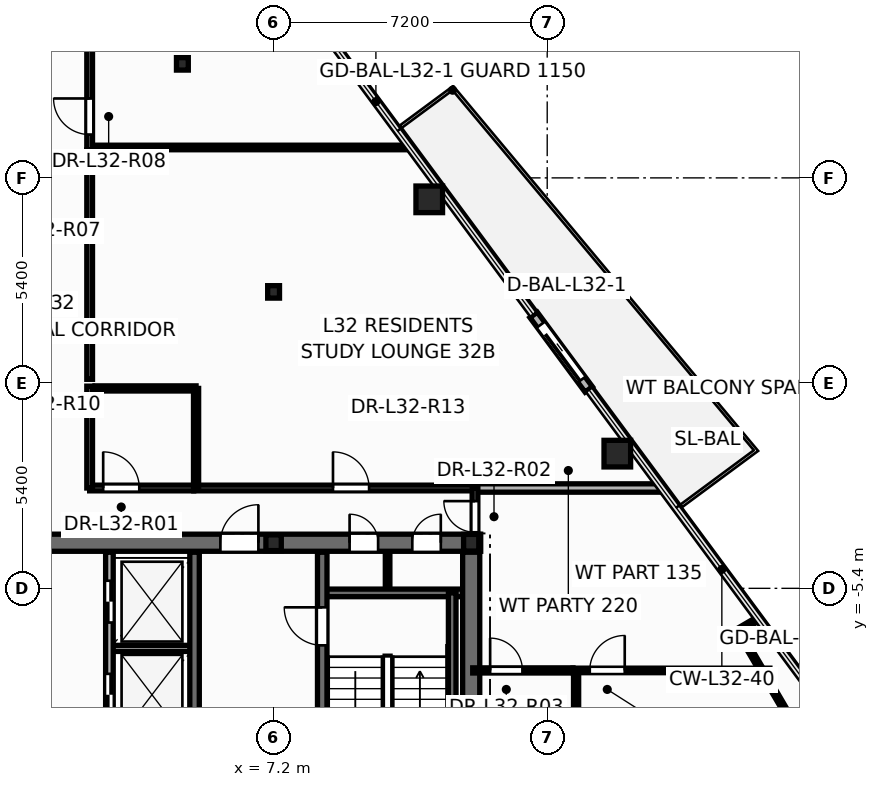
"""IFC4 building model, lengths in metres.
Left out: names, types, materials, properties, quantities, classifications, styles, units other than length and angle.
Written with IfcOpenShell. Run it as: python <this file> out.ifc"""

import sys

from ifc_helpers import new_model, si_unit, direction, frame, frame_2d, origin, origin_2d, place, context, subcontext, project, spatial, rectangle, hollow_circle, i_section, extrude, element, fill, save


model = new_model("IFC4")
c1 = context("Model", 3, precision=1e-05, world=origin(), true_north=direction((0.0, 1.0)))
c2 = subcontext(c1, "Body", "Model", "MODEL_VIEW")
j1 = project(units=[si_unit("LENGTHUNIT", "METRE"), si_unit("PLANEANGLEUNIT", "RADIAN")], contexts=[c1])
p1 = place(None, origin())
s1 = spatial("IfcSite", under=j1, at=p1, CompositionType="ELEMENT")
p2 = place(p1, origin())
s2 = spatial("IfcBuilding", under=s1, at=p2, CompositionType="ELEMENT")
p3 = place(p2, frame((0.0, 0.0, 125.7)))
s3 = spatial("IfcBuildingStorey", under=s2, at=p3, CompositionType="ELEMENT", Elevation=125.7)
for number, where, z_axis, x_axis in (
    (1, (16.245, -1.856, 0.0), (0.0, 0.0, 1.0), (1.0, 0.0, 0.0)),
    (2, (11.296, 4.836, 0.0), (0.0, 0.0, 1.0), (1.0, 0.0, 0.0)),
):
    element("IfcColumn", number, at=place(p3, frame(where, z_axis=z_axis, x_axis=x_axis)), inside=s3, PredefinedType="COLUMN", context=c2, shape_type="SweptSolid", body=[
        extrude(hollow_circle(Radius=0.35, WallThickness=0.03, at=origin_2d()), origin(), (0.0, 0.0, 1.0), 3.6),
    ])
p4 = place(p3, frame((12.4, -4.2, 0.0), z_axis=(0.0, 0.0, 1.0), x_axis=(1.0, 0.0, 0.0)))
e3 = element("IfcColumn", 3, at=p4, inside=s3, PredefinedType="COLUMN", context=c2, shape_type="SweptSolid", body=[
    extrude(i_section(OverallWidth=0.4, OverallDepth=0.44, WebThickness=0.028, FlangeThickness=0.04, at=origin_2d()), origin(), (0.0, 0.0, 1.0), 3.6),
])
p5 = place(p3, frame((7.2, -4.2, 0.0), z_axis=(0.0, 0.0, 1.0), x_axis=(1.0, 0.0, 0.0)))
e4 = element("IfcColumn", 4, at=p5, inside=s3, PredefinedType="PILASTER", context=c2, shape_type="SweptSolid", body=[
    extrude(i_section(OverallWidth=0.405, OverallDepth=0.414, WebThickness=0.022, FlangeThickness=0.032, at=origin_2d()), origin(), (0.0, 0.0, 1.0), 3.6),
])
for number, where, z_axis, x_axis in (
    (5, (7.2, 2.4, 0.0), (0.0, 0.0, 1.0), (1.0, 0.0, 0.0)),
    (6, (4.8, 8.4, 0.0), (0.0, 0.0, 1.0), (1.0, 0.0, 0.0)),
):
    element("IfcColumn", number, at=place(p3, frame(where, z_axis=z_axis, x_axis=x_axis)), inside=s3, PredefinedType="COLUMN", context=c2, shape_type="SweptSolid", body=[
        extrude(i_section(OverallWidth=0.311, OverallDepth=0.327, WebThickness=0.016, FlangeThickness=0.025, at=origin_2d()), origin(), (0.0, 0.0, 1.0), 3.6),
    ])
p6 = place(p3, frame((15.493, -0.166, -0.015), z_axis=(0.0, 0.0, 1.0), x_axis=(-0.594655490218, 0.803980626603, 0.0)))
e7 = element("IfcWall", 7, at=p6, inside=s3, PredefinedType="STANDARD", context=c2, shape_type="SweptSolid", body=[
    extrude(rectangle(XDim=2.44, YDim=0.24, at=frame_2d((1.22, 0.0))), origin(), (0.0, 0.0, 1.0), 2.807),
])
p7 = place(p6, frame((0.32, 0.0, 0.015)))
e8 = element("IfcOpeningElement", 8, at=p7, cuts=e7, PredefinedType="OPENING", context=c2, shape_type="SweptSolid", body=[
    extrude(rectangle(XDim=1.806, YDim=2.204, at=frame_2d((0.9, 1.102))), frame((0.0, 0.13, 0.0), z_axis=(0.0, -1.0, 0.0), x_axis=(1.0, 0.0, 0.0)), (0.0, 0.0, 1.0), 0.26),
])
p8 = place(p3, frame((2.88, -6.98, 0.0), z_axis=(0.0, 0.0, 1.0), x_axis=(1.0, 0.0, 0.0)))
e9 = element("IfcWall", 9, at=p8, inside=s3, PredefinedType="PARTITIONING", context=c2, shape_type="SweptSolid", body=[
    extrude(rectangle(XDim=2.24, YDim=0.16, at=frame_2d((1.12, 0.0))), origin(), (0.0, 0.0, 1.0), 3.35),
])
p9 = place(p3, frame((10.2, -5.52, 0.0), z_axis=(0.0, 0.0, 1.0), x_axis=(0.0, 1.0, 0.0)))
e10 = element("IfcWall", 10, at=p9, inside=s3, PredefinedType="PARTITIONING", context=c2, shape_type="SweptSolid", body=[
    extrude(rectangle(XDim=1.12, YDim=0.12, at=frame_2d((0.56, 0.0))), origin(), (0.0, 0.0, 1.0), 3.35),
])
p10 = place(p3, frame((-12.65, -4.2, 0.0), z_axis=(0.0, 0.0, 1.0), x_axis=(1.0, 0.0, 0.0)))
e11 = element("IfcWall", 11, at=p10, inside=s3, PredefinedType="SHEAR", context=c2, shape_type="SweptSolid", body=[
    extrude(rectangle(XDim=25.3, YDim=0.45, at=frame_2d((12.65, 0.0))), origin(), (0.0, 0.0, 1.0), 3.6),
])
p11 = place(p10, frame((0.95, 0.0, 0.0)))
e12 = element("IfcOpeningElement", 12, at=p11, cuts=e11, PredefinedType="OPENING", context=c2, shape_type="SweptSolid", body=[
    extrude(rectangle(XDim=0.756, YDim=2.054, at=frame_2d((0.375, 1.027))), frame((0.0, 0.235, 0.0), z_axis=(0.0, -1.0, 0.0), x_axis=(1.0, 0.0, 0.0)), (0.0, 0.0, 1.0), 0.47),
])
p12 = place(p10, frame((2.6, 0.0, 0.0)))
e13 = element("IfcOpeningElement", 13, at=p12, cuts=e11, PredefinedType="OPENING", context=c2, shape_type="SweptSolid", body=[
    extrude(rectangle(XDim=0.756, YDim=2.054, at=frame_2d((0.375, 1.027))), frame((0.0, 0.235, 0.0), z_axis=(0.0, -1.0, 0.0), x_axis=(1.0, 0.0, 0.0)), (0.0, 0.0, 1.0), 0.47),
])
p13 = place(p10, frame((21.85, 0.0, 0.0)))
e14 = element("IfcOpeningElement", 14, at=p13, cuts=e11, PredefinedType="OPENING", context=c2, shape_type="SweptSolid", body=[
    extrude(rectangle(XDim=0.756, YDim=2.054, at=frame_2d((0.375, 1.027))), frame((0.0, 0.235, 0.0), z_axis=(0.0, -1.0, 0.0), x_axis=(1.0, 0.0, 0.0)), (0.0, 0.0, 1.0), 0.47),
])
p14 = place(p10, frame((23.5, 0.0, 0.0)))
e15 = element("IfcOpeningElement", 15, at=p14, cuts=e11, PredefinedType="OPENING", context=c2, shape_type="SweptSolid", body=[
    extrude(rectangle(XDim=0.756, YDim=2.054, at=frame_2d((0.375, 1.027))), frame((0.0, 0.235, 0.0), z_axis=(0.0, -1.0, 0.0), x_axis=(1.0, 0.0, 0.0)), (0.0, 0.0, 1.0), 0.47),
])
p15 = place(p10, frame((5.85, 0.0, 0.0)))
e16 = element("IfcOpeningElement", 16, at=p15, cuts=e11, PredefinedType="OPENING", context=c2, shape_type="SweptSolid", body=[
    extrude(rectangle(XDim=1.006, YDim=2.104, at=frame_2d((0.5, 1.052))), frame((0.0, 0.235, 0.0), z_axis=(0.0, -1.0, 0.0), x_axis=(1.0, 0.0, 0.0)), (0.0, 0.0, 1.0), 0.47),
])
p16 = place(p10, frame((10.35, 0.0, 0.0)))
e17 = element("IfcOpeningElement", 17, at=p16, cuts=e11, PredefinedType="OPENING", context=c2, shape_type="SweptSolid", body=[
    extrude(rectangle(XDim=1.406, YDim=2.154, at=frame_2d((0.7, 1.077))), frame((0.0, 0.235, 0.0), z_axis=(0.0, -1.0, 0.0), x_axis=(1.0, 0.0, 0.0)), (0.0, 0.0, 1.0), 0.47),
])
p17 = place(p10, frame((18.45, 0.0, 0.0)))
e18 = element("IfcOpeningElement", 18, at=p17, cuts=e11, PredefinedType="OPENING", context=c2, shape_type="SweptSolid", body=[
    extrude(rectangle(XDim=1.006, YDim=2.104, at=frame_2d((0.5, 1.052))), frame((0.0, 0.235, 0.0), z_axis=(0.0, -1.0, 0.0), x_axis=(1.0, 0.0, 0.0)), (0.0, 0.0, 1.0), 0.47),
])
p18 = place(p3, frame((8.48, -5.52, 0.0), z_axis=(0.0, 0.0, 1.0), x_axis=(1.0, 0.0, 0.0)))
e19 = element("IfcWall", 19, at=p18, inside=s3, PredefinedType="SOLIDWALL", context=c2, shape_type="SweptSolid", body=[
    extrude(rectangle(XDim=3.87, YDim=0.2, at=frame_2d((1.935, 0.0))), origin(), (0.0, 0.0, 1.0), 3.6),
])
p19 = place(p3, frame((11.9, -13.1, 0.0), z_axis=(0.0, 0.0, 1.0), x_axis=(0.0, 1.0, 0.0)))
e20 = element("IfcWall", 20, at=p19, inside=s3, PredefinedType="SOLIDWALL", context=c2, shape_type="SweptSolid", body=[
    extrude(rectangle(XDim=7.58, YDim=0.2, at=frame_2d((3.79, 0.0))), origin(), (0.0, 0.0, 1.0), 3.6),
])
p20 = place(p3, frame((8.48, -13.85, 0.0), z_axis=(0.0, 0.0, 1.0), x_axis=(0.0, 1.0, 0.0)))
e21 = element("IfcWall", 21, at=p20, inside=s3, PredefinedType="SHEAR", context=c2, shape_type="SweptSolid", body=[
    extrude(rectangle(XDim=9.4, YDim=0.25, at=frame_2d((4.7, 0.0))), origin(), (0.0, 0.0, 1.0), 3.6),
])
p21 = place(p20, frame((6.95, 0.0, 0.0)))
e22 = element("IfcOpeningElement", 22, at=p21, cuts=e21, PredefinedType="OPENING", context=c2, shape_type="SweptSolid", body=[
    extrude(rectangle(XDim=1.006, YDim=2.104, at=frame_2d((0.5, 1.052))), frame((0.0, 0.135, 0.0), z_axis=(0.0, -1.0, 0.0), x_axis=(1.0, 0.0, 0.0)), (0.0, 0.0, 1.0), 0.27),
])
p22 = place(p3, frame((5.12, -13.85, 0.0), z_axis=(0.0, 0.0, 1.0), x_axis=(0.0, 1.0, 0.0)))
e23 = element("IfcWall", 23, at=p22, inside=s3, PredefinedType="SHEAR", context=c2, shape_type="SweptSolid", body=[
    extrude(rectangle(XDim=9.4, YDim=0.25, at=frame_2d((4.7, 0.0))), origin(), (0.0, 0.0, 1.0), 3.6),
])
p23 = place(p3, frame((12.4, -13.85, 0.0), z_axis=(0.0, 0.0, 1.0), x_axis=(0.0, 1.0, 0.0)))
e24 = element("IfcWall", 24, at=p23, inside=s3, PredefinedType="SHEAR", context=c2, shape_type="SweptSolid", body=[
    extrude(rectangle(XDim=9.4, YDim=0.45, at=frame_2d((4.7, 0.0))), origin(), (0.0, 0.0, 1.0), 3.6),
])
p24 = place(p3, frame((2.88, -9.45, 0.0), z_axis=(0.0, 0.0, 1.0), x_axis=(0.0, 1.0, 0.0)))
e25 = element("IfcWall", 25, at=p24, inside=s3, PredefinedType="SOLIDWALL", context=c2, shape_type="SweptSolid", body=[
    extrude(rectangle(XDim=5.0, YDim=0.2, at=frame_2d((2.5, 0.0))), origin(), (0.0, 0.0, 1.0), 3.35),
])
p25 = place(p24, frame((0.7, 0.0, 0.0)))
e26 = element("IfcOpeningElement", 26, at=p25, cuts=e25, PredefinedType="OPENING", context=c2, shape_type="SweptSolid", body=[
    extrude(rectangle(XDim=1.106, YDim=2.104, at=frame_2d((0.55, 1.052))), frame((0.0, 0.11, 0.0), z_axis=(0.0, -1.0, 0.0), x_axis=(1.0, 0.0, 0.0)), (0.0, 0.0, 1.0), 0.22),
])
p26 = place(p24, frame((3.15, 0.0, 0.0)))
e27 = element("IfcOpeningElement", 27, at=p26, cuts=e25, PredefinedType="OPENING", context=c2, shape_type="SweptSolid", body=[
    extrude(rectangle(XDim=1.106, YDim=2.104, at=frame_2d((0.55, 1.052))), frame((0.0, 0.11, 0.0), z_axis=(0.0, -1.0, 0.0), x_axis=(1.0, 0.0, 0.0)), (0.0, 0.0, 1.0), 0.22),
])
p27 = place(p3, frame((2.36, 6.2, 0.0), z_axis=(0.0, 0.0, 1.0), x_axis=(1.0, 0.0, 0.0)))
e28 = element("IfcWall", 28, at=p27, inside=s3, PredefinedType="PARTITIONING", context=c2, shape_type="SweptSolid", body=[
    extrude(rectangle(XDim=8.424, YDim=0.12, at=frame_2d((4.212, 0.0))), origin(), (0.0, 0.0, 1.0), 2.325),
])
p28 = place(p3, frame((5.1, -2.76, 0.0), z_axis=(0.0, 0.0, 1.0), x_axis=(1.0, 0.0, 0.0)))
e29 = element("IfcWall", 29, at=p28, inside=s3, PredefinedType="PARTITIONING", context=c2, shape_type="SweptSolid", body=[
    extrude(rectangle(XDim=7.4, YDim=0.15, at=frame_2d((3.7, 0.0))), origin(), (0.0, 0.0, 1.0), 2.325),
])
p29 = place(p28, frame((3.663, 0.0, 0.0)))
e30 = element("IfcOpeningElement", 30, at=p29, cuts=e29, PredefinedType="OPENING", context=c2, shape_type="SweptSolid", body=[
    extrude(rectangle(XDim=0.956, YDim=2.104, at=frame_2d((0.475, 1.052))), frame((0.0, 0.085, 0.0), z_axis=(0.0, -1.0, 0.0), x_axis=(1.0, 0.0, 0.0)), (0.0, 0.0, 1.0), 0.17),
])
p30 = place(p3, frame((2.36, 6.14, 0.0), z_axis=(0.0, 0.0, 1.0), x_axis=(0.0, 1.0, 0.0)))
e31 = element("IfcWall", 31, at=p30, inside=s3, PredefinedType="PARTITIONING", context=c2, shape_type="SweptSolid", body=[
    extrude(rectangle(XDim=6.902, YDim=0.15, at=frame_2d((3.451, 0.0))), origin(), (0.0, 0.0, 1.0), 2.325),
])
p31 = place(p30, frame((0.399, 0.0, 0.0)))
e32 = element("IfcOpeningElement", 32, at=p31, cuts=e31, PredefinedType="OPENING", context=c2, shape_type="SweptSolid", body=[
    extrude(rectangle(XDim=0.956, YDim=2.104, at=frame_2d((0.475, 1.052))), frame((0.0, 0.085, 0.0), z_axis=(0.0, -1.0, 0.0), x_axis=(1.0, 0.0, 0.0)), (0.0, 0.0, 1.0), 0.17),
])
p32 = place(p3, frame((2.36, 0.1, 0.0), z_axis=(0.0, 0.0, 1.0), x_axis=(0.0, 1.0, 0.0)))
e33 = element("IfcWall", 33, at=p32, inside=s3, PredefinedType="PARTITIONING", context=c2, shape_type="SweptSolid", body=[
    extrude(rectangle(XDim=6.038, YDim=0.15, at=frame_2d((3.019, 0.0))), origin(), (0.0, 0.0, 1.0), 2.325),
])
p33 = place(p3, frame((15.08, -7.56, 0.0), z_axis=(0.0, 0.0, 1.0), x_axis=(1.0, 0.0, 0.0)))
e34 = element("IfcWall", 34, at=p33, inside=s3, PredefinedType="PARTITIONING", context=c2, shape_type="SweptSolid", body=[
    extrude(rectangle(XDim=5.18, YDim=0.12, at=frame_2d((2.59, 0.0))), origin(), (0.0, 0.0, 1.0), 2.325),
])
p34 = place(p33, frame((0.44, 0.0, 0.0)))
e35 = element("IfcOpeningElement", 35, at=p34, cuts=e34, PredefinedType="OPENING", context=c2, shape_type="SweptSolid", body=[
    extrude(rectangle(XDim=0.926, YDim=2.104, at=frame_2d((0.46, 1.052))), frame((0.0, 0.07, 0.0), z_axis=(0.0, -1.0, 0.0), x_axis=(1.0, 0.0, 0.0)), (0.0, 0.0, 1.0), 0.14),
])
p35 = place(p3, frame((12.5, -2.76, 0.0), z_axis=(0.0, 0.0, 1.0), x_axis=(1.0, 0.0, 0.0)))
e36 = element("IfcWall", 36, at=p35, inside=s3, PredefinedType="PARTITIONING", context=c2, shape_type="SweptSolid", body=[
    extrude(rectangle(XDim=4.911, YDim=0.22, at=frame_2d((2.456, 0.0))), origin(), (0.0, 0.0, 1.0), 2.792),
])
p36 = place(p3, frame((2.36, -2.76, 0.0), z_axis=(0.0, 0.0, 1.0), x_axis=(1.0, 0.0, 0.0)))
e37 = element("IfcWall", 37, at=p36, inside=s3, PredefinedType="PARTITIONING", context=c2, shape_type="SweptSolid", body=[
    extrude(rectangle(XDim=2.738, YDim=0.15, at=frame_2d((1.369, 0.0))), origin(), (0.0, 0.0, 1.0), 2.919),
])
p37 = place(p36, frame((0.356, 0.0, 0.0)))
e38 = element("IfcOpeningElement", 38, at=p37, cuts=e37, PredefinedType="OPENING", context=c2, shape_type="SweptSolid", body=[
    extrude(rectangle(XDim=0.956, YDim=2.104, at=frame_2d((0.475, 1.052))), frame((0.0, 0.085, 0.0), z_axis=(0.0, -1.0, 0.0), x_axis=(1.0, 0.0, 0.0)), (0.0, 0.0, 1.0), 0.17),
])
p38 = place(p3, frame((12.44, -7.56, 0.0), z_axis=(0.0, 0.0, 1.0), x_axis=(1.0, 0.0, 0.0)))
e39 = element("IfcWall", 39, at=p38, inside=s3, PredefinedType="PARTITIONING", context=c2, shape_type="SweptSolid", body=[
    extrude(rectangle(XDim=2.638, YDim=0.135, at=frame_2d((1.319, 0.0))), origin(), (0.0, 0.0, 1.0), 2.792),
])
p39 = place(p38, frame((0.458, 0.0, 0.0)))
e40 = element("IfcOpeningElement", 40, at=p39, cuts=e39, PredefinedType="OPENING", context=c2, shape_type="SweptSolid", body=[
    extrude(rectangle(XDim=0.856, YDim=2.104, at=frame_2d((0.425, 1.052))), frame((0.0, 0.078, 0.0), z_axis=(0.0, -1.0, 0.0), x_axis=(1.0, 0.0, 0.0)), (0.0, 0.0, 1.0), 0.155),
])
p40 = place(p3, frame((15.16, -10.3, 0.0), z_axis=(0.0, 0.0, 1.0), x_axis=(0.0, 1.0, 0.0)))
e41 = element("IfcWall", 41, at=p40, inside=s3, PredefinedType="PARTITIONING", context=c2, shape_type="SweptSolid", body=[
    extrude(rectangle(XDim=2.74, YDim=0.135, at=frame_2d((1.37, 0.0))), origin(), (0.0, 0.0, 1.0), 3.35),
])
p41 = place(p3, frame((2.36, -2.76, 0.0), z_axis=(0.0, 0.0, 1.0), x_axis=(0.0, 1.0, 0.0)))
e42 = element("IfcWall", 42, at=p41, inside=s3, PredefinedType="PARTITIONING", context=c2, shape_type="SweptSolid", body=[
    extrude(rectangle(XDim=2.68, YDim=0.15, at=frame_2d((1.34, 0.0))), origin(), (0.0, 0.0, 1.0), 3.35),
])
p42 = place(p3, frame((5.16, -2.76, 0.0), z_axis=(0.0, 0.0, 1.0), x_axis=(0.0, 1.0, 0.0)))
e43 = element("IfcWall", 43, at=p42, inside=s3, PredefinedType="PARTITIONING", context=c2, shape_type="SweptSolid", body=[
    extrude(rectangle(XDim=2.62, YDim=0.135, at=frame_2d((1.31, 0.0))), origin(), (0.0, 0.0, 1.0), 3.35),
])
p43 = place(p3, frame((20.733, -8.735, 0.0), z_axis=(0.0, 0.0, 1.0), x_axis=(-0.505993956434, 0.862537023004, 0.0)))
e44 = element("IfcWall", 44, at=p43, inside=s3, PredefinedType="PARTITIONING", context=c2, shape_type="SweptSolid", body=[
    extrude(rectangle(XDim=2.579, YDim=0.12, at=frame_2d((1.29, 0.0))), origin(), (0.0, 0.0, 1.0), 2.325),
])
p44 = place(p3, frame((12.5, -4.24, 0.0), z_axis=(0.0, 0.0, 1.0), x_axis=(0.0, 1.0, 0.0)))
e45 = element("IfcWall", 45, at=p44, inside=s3, PredefinedType="PARTITIONING", context=c2, shape_type="SweptSolid", body=[
    extrude(rectangle(XDim=1.48, YDim=0.15, at=frame_2d((0.74, 0.0))), origin(), (0.0, 0.0, 1.0), 2.325),
])
p45 = place(p44, frame((0.315, 0.0, 0.0)))
e46 = element("IfcOpeningElement", 46, at=p45, cuts=e45, PredefinedType="OPENING", context=c2, shape_type="SweptSolid", body=[
    extrude(rectangle(XDim=0.826, YDim=2.104, at=frame_2d((0.41, 1.052))), frame((0.0, 0.085, 0.0), z_axis=(0.0, -1.0, 0.0), x_axis=(1.0, 0.0, 0.0)), (0.0, 0.0, 1.0), 0.17),
])
p46 = place(p3, frame((19.428, -6.51, 0.0), z_axis=(0.0, 0.0, 1.0), x_axis=(0.86267356237, 0.505761134121, 0.0)))
e47 = element("IfcWall", 47, at=p46, inside=s3, PredefinedType="PARTITIONING", context=c2, shape_type="SweptSolid", body=[
    extrude(rectangle(XDim=0.602, YDim=0.12, at=frame_2d((0.301, 0.0))), origin(), (0.0, 0.0, 1.0), 2.792),
])
p47 = place(p3, frame((2.5, -0.14, 0.0), z_axis=(0.0, 0.0, 1.0), x_axis=(1.0, 0.0, 0.0)))
e48 = element("IfcWall", 48, at=p47, inside=s3, PredefinedType="PARTITIONING", context=c2, shape_type="SweptSolid", body=[
    extrude(rectangle(XDim=2.66, YDim=0.135, at=frame_2d((1.33, 0.0))), origin(), (0.0, 0.0, 1.0), 2.919),
])
p48 = place(p7, origin())
e49 = element("IfcDoor", 49, at=p48, inside=s3, OperationType="SLIDING_TO_LEFT", PredefinedType="DOOR", context=c2, shape_type="SweptSolid", body=[
    extrude(rectangle(XDim=1.8, YDim=2.2, at=frame_2d((0.9, 1.1))), frame((0.0, 0.025, 0.0), z_axis=(0.0, -1.0, 0.0), x_axis=(1.0, 0.0, 0.0)), (0.0, 0.0, 1.0), 0.05),
])
fill(e8, e49)
p49 = place(p25, origin())
e50 = element("IfcDoor", 50, at=p49, inside=s3, OperationType="DOUBLE_DOOR_SLIDING", PredefinedType="DOOR", context=c2, shape_type="SweptSolid", body=[
    extrude(rectangle(XDim=1.1, YDim=2.1, at=frame_2d((0.55, 1.05))), frame((0.0, 0.025, 0.0), z_axis=(0.0, -1.0, 0.0), x_axis=(1.0, 0.0, 0.0)), (0.0, 0.0, 1.0), 0.05),
])
fill(e26, e50)
p50 = place(p26, origin())
e51 = element("IfcDoor", 51, at=p50, inside=s3, OperationType="DOUBLE_DOOR_SLIDING", PredefinedType="DOOR", context=c2, shape_type="SweptSolid", body=[
    extrude(rectangle(XDim=1.1, YDim=2.1, at=frame_2d((0.55, 1.05))), frame((0.0, 0.025, 0.0), z_axis=(0.0, -1.0, 0.0), x_axis=(1.0, 0.0, 0.0)), (0.0, 0.0, 1.0), 0.05),
])
fill(e27, e51)
p51 = place(p21, origin())
e52 = element("IfcDoor", 52, at=p51, inside=s3, OperationType="SINGLE_SWING_RIGHT", PredefinedType="DOOR", context=c2, shape_type="SweptSolid", body=[
    extrude(rectangle(XDim=1.0, YDim=2.1, at=frame_2d((0.5, 1.05))), frame((0.0, 0.025, 0.0), z_axis=(0.0, -1.0, 0.0), x_axis=(1.0, 0.0, 0.0)), (0.0, 0.0, 1.0), 0.05),
])
fill(e22, e52)
p52 = place(p13, origin())
e53 = element("IfcDoor", 53, at=p52, inside=s3, OperationType="SINGLE_SWING_LEFT", PredefinedType="DOOR", context=c2, shape_type="SweptSolid", body=[
    extrude(rectangle(XDim=0.75, YDim=2.05, at=frame_2d((0.375, 1.025))), frame((0.0, 0.025, 0.0), z_axis=(0.0, -1.0, 0.0), x_axis=(1.0, 0.0, 0.0)), (0.0, 0.0, 1.0), 0.05),
])
fill(e14, e53)
p53 = place(p14, origin())
e54 = element("IfcDoor", 54, at=p53, inside=s3, OperationType="SINGLE_SWING_RIGHT", PredefinedType="DOOR", context=c2, shape_type="SweptSolid", body=[
    extrude(rectangle(XDim=0.75, YDim=2.05, at=frame_2d((0.375, 1.025))), frame((0.0, 0.025, 0.0), z_axis=(0.0, -1.0, 0.0), x_axis=(1.0, 0.0, 0.0)), (0.0, 0.0, 1.0), 0.05),
])
fill(e15, e54)
p54 = place(p17, origin())
e55 = element("IfcDoor", 55, at=p54, inside=s3, OperationType="SINGLE_SWING_RIGHT", PredefinedType="DOOR", context=c2, shape_type="SweptSolid", body=[
    extrude(rectangle(XDim=1.0, YDim=2.1, at=frame_2d((0.5, 1.05))), frame((0.0, 0.025, 0.0), z_axis=(0.0, -1.0, 0.0), x_axis=(1.0, 0.0, 0.0)), (0.0, 0.0, 1.0), 0.05),
])
fill(e18, e55)
p55 = place(p37, origin())
e56 = element("IfcDoor", 56, at=p55, inside=s3, OperationType="SINGLE_SWING_LEFT", PredefinedType="DOOR", context=c2, shape_type="SweptSolid", body=[
    extrude(rectangle(XDim=0.95, YDim=2.1, at=frame_2d((0.475, 1.05))), frame((0.0, 0.025, 0.0), z_axis=(0.0, -1.0, 0.0), x_axis=(1.0, 0.0, 0.0)), (0.0, 0.0, 1.0), 0.05),
])
fill(e38, e56)
p56 = place(p45, origin())
e57 = element("IfcDoor", 57, at=p56, inside=s3, OperationType="SINGLE_SWING_RIGHT", PredefinedType="DOOR", context=c2, shape_type="SweptSolid", body=[
    extrude(rectangle(XDim=0.82, YDim=2.1, at=frame_2d((0.41, 1.05))), frame((0.0, 0.025, 0.0), z_axis=(0.0, -1.0, 0.0), x_axis=(1.0, 0.0, 0.0)), (0.0, 0.0, 1.0), 0.05),
])
fill(e46, e57)
p57 = place(p39, origin())
e58 = element("IfcDoor", 58, at=p57, inside=s3, OperationType="SINGLE_SWING_LEFT", PredefinedType="DOOR", context=c2, shape_type="SweptSolid", body=[
    extrude(rectangle(XDim=0.85, YDim=2.1, at=frame_2d((0.425, 1.05))), frame((0.0, 0.025, 0.0), z_axis=(0.0, -1.0, 0.0), x_axis=(1.0, 0.0, 0.0)), (0.0, 0.0, 1.0), 0.05),
])
fill(e40, e58)
p58 = place(p34, origin())
e59 = element("IfcDoor", 59, at=p58, inside=s3, OperationType="SINGLE_SWING_RIGHT", PredefinedType="DOOR", context=c2, shape_type="SweptSolid", body=[
    extrude(rectangle(XDim=0.92, YDim=2.1, at=frame_2d((0.46, 1.05))), frame((0.0, 0.025, 0.0), z_axis=(0.0, -1.0, 0.0), x_axis=(1.0, 0.0, 0.0)), (0.0, 0.0, 1.0), 0.05),
])
fill(e35, e59)
p59 = place(p31, origin())
e60 = element("IfcDoor", 60, at=p59, inside=s3, OperationType="SINGLE_SWING_RIGHT", PredefinedType="DOOR", context=c2, shape_type="SweptSolid", body=[
    extrude(rectangle(XDim=0.95, YDim=2.1, at=frame_2d((0.475, 1.05))), frame((0.0, 0.025, 0.0), z_axis=(0.0, -1.0, 0.0), x_axis=(1.0, 0.0, 0.0)), (0.0, 0.0, 1.0), 0.05),
])
fill(e32, e60)
p60 = place(p29, origin())
e61 = element("IfcDoor", 61, at=p60, inside=s3, OperationType="SINGLE_SWING_LEFT", PredefinedType="DOOR", context=c2, shape_type="SweptSolid", body=[
    extrude(rectangle(XDim=0.95, YDim=2.1, at=frame_2d((0.475, 1.05))), frame((0.0, 0.025, 0.0), z_axis=(0.0, -1.0, 0.0), x_axis=(1.0, 0.0, 0.0)), (0.0, 0.0, 1.0), 0.05),
])
fill(e30, e61)
save(model, sys.argv[1])
